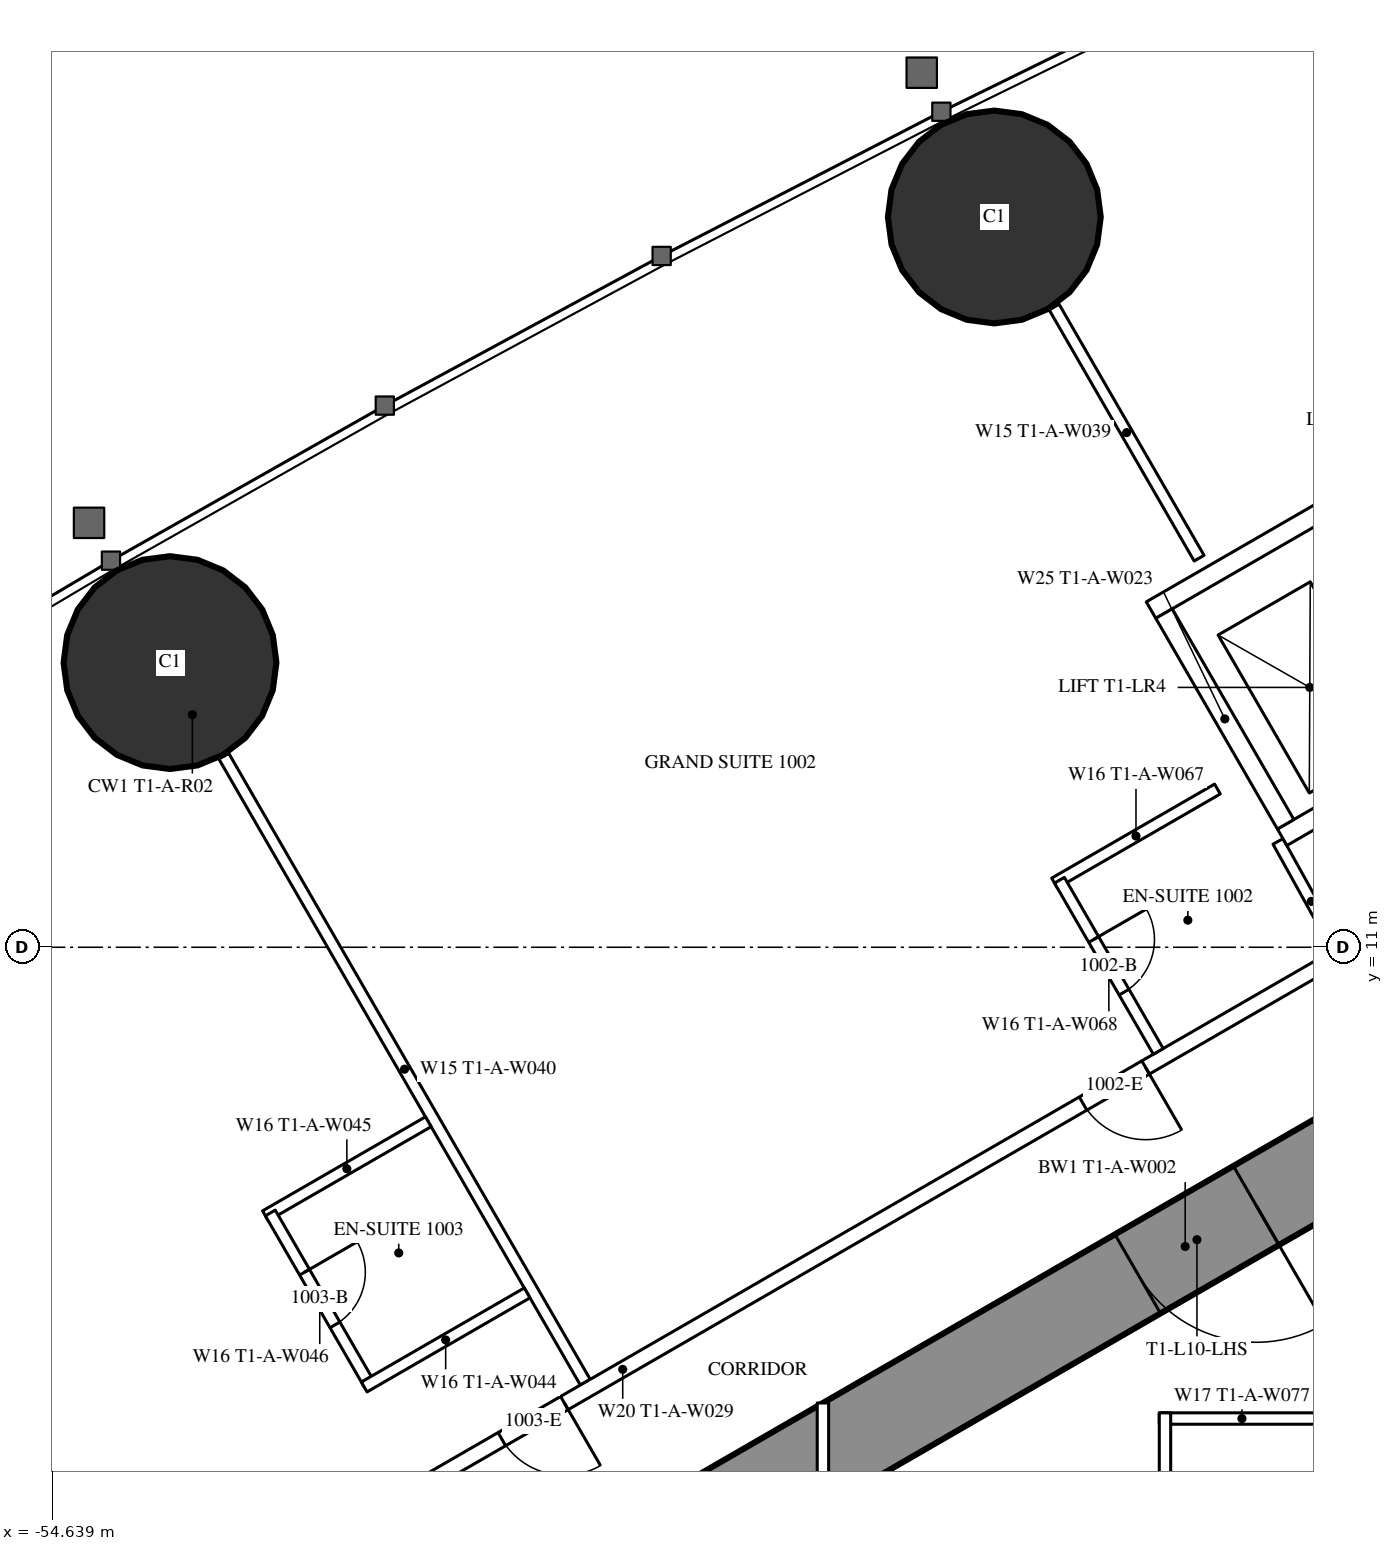
"""IFC4 building model, lengths in metres.
Left out: names, types, materials, properties, quantities, classifications, styles, units other than length and angle.
Written with IfcOpenShell. Run it as: python <this file> out.ifc"""

import sys

from ifc_helpers import new_model, si_unit, direction, frame, frame_2d, origin, origin_2d, place, context, subcontext, project, spatial, rectangle, hollow_circle, extrude, element, fill, save


model = new_model("IFC4")
c1 = context("Model", 3, precision=1e-05, world=origin(), true_north=direction((0.0, 1.0)))
c2 = subcontext(c1, "Body", "Model", "MODEL_VIEW")
j1 = project(units=[si_unit("LENGTHUNIT", "METRE"), si_unit("PLANEANGLEUNIT", "RADIAN")], contexts=[c1])
p1 = place(None, origin())
s1 = spatial("IfcSite", under=j1, at=p1, CompositionType="ELEMENT")
p2 = place(p1, origin())
s2 = spatial("IfcBuilding", under=s1, at=p2, CompositionType="ELEMENT")
p3 = place(p2, frame((0.0, 0.0, 42.5)))
s3 = spatial("IfcBuildingStorey", under=s2, at=p3, CompositionType="ELEMENT", Elevation=42.5)
for number, where, z_axis, x_axis in (
    (1, (-42.245, 20.607, 0.0), (0.0, 0.0, 1.0), (1.0, 0.0, 0.0)),
    (2, (-53.09, 14.745, 0.0), (0.0, 0.0, 1.0), (1.0, 0.0, 0.0)),
):
    element("IfcColumn", number, at=place(p3, frame(where, z_axis=z_axis, x_axis=x_axis)), inside=s3, PredefinedType="COLUMN", context=c2, shape_type="SweptSolid", body=[
        extrude(hollow_circle(Radius=1.4, WallThickness=0.12, at=origin_2d()), origin(), (0.0, 0.0, 1.0), 3.5),
    ])
p4 = place(p3, frame((-27.2, 14.3, 0.0), z_axis=(0.0, 0.0, 1.0), x_axis=(-0.866026593062, -0.499997940104, 0.0)))
e3 = element("IfcWall", 3, at=p4, inside=s3, PredefinedType="SHEAR", context=c2, shape_type="SweptSolid", body=[
    extrude(rectangle(XDim=28.946, YDim=1.2, at=frame_2d((14.473, 0.0))), origin(), (0.0, 0.0, 1.0), 3.5),
])
p5 = place(p4, frame((4.6, 0.0, 0.0)))
e4 = element("IfcOpeningElement", 4, at=p5, cuts=e3, PredefinedType="OPENING", context=c2, shape_type="SweptSolid", body=[
    extrude(rectangle(XDim=1.0, YDim=2.2, at=frame_2d((0.5, 1.1))), frame((0.0, 0.61, 0.0), z_axis=(0.0, -1.0, 0.0), x_axis=(1.0, 0.0, 0.0)), (0.0, 0.0, 1.0), 1.22),
])
p6 = place(p4, frame((13.395, 0.0, 0.0)))
e5 = element("IfcOpeningElement", 5, at=p6, cuts=e3, PredefinedType="OPENING", context=c2, shape_type="SweptSolid", body=[
    extrude(rectangle(XDim=1.8, YDim=2.2, at=frame_2d((0.9, 1.1))), frame((0.0, 0.61, 0.0), z_axis=(0.0, -1.0, 0.0), x_axis=(1.0, 0.0, 0.0)), (0.0, 0.0, 1.0), 1.22),
])
p7 = place(p3, frame((-47.627, 5.278, 0.0), z_axis=(0.0, 0.0, 1.0), x_axis=(-0.500009844318, 0.86601972009, 0.0)))
e6 = element("IfcWall", 6, at=p7, inside=s3, PredefinedType="PARTITIONING", context=c2, shape_type="SweptSolid", body=[
    extrude(rectangle(XDim=9.51, YDim=0.15, at=frame_2d((4.755, 0.0))), origin(), (0.0, 0.0, 1.0), 2.25),
])
p8 = place(p3, frame((-39.551, 16.119, 0.0), z_axis=(0.0, 0.0, 1.0), x_axis=(-0.500014214979, 0.866017196607, 0.0)))
e7 = element("IfcWall", 7, at=p8, inside=s3, PredefinedType="PARTITIONING", context=c2, shape_type="SweptSolid", body=[
    extrude(rectangle(XDim=3.815, YDim=0.15, at=frame_2d((1.907, 0.0))), origin(), (0.0, 0.0, 1.0), 3.25),
])
p9 = place(p3, frame((-37.7, 10.894, 0.0), z_axis=(0.0, 0.0, 1.0), x_axis=(-0.866027905338, -0.499995667157, 0.0)))
e8 = element("IfcWall", 8, at=p9, inside=s3, PredefinedType="PARTITIONING", context=c2, shape_type="SweptSolid", body=[
    extrude(rectangle(XDim=21.787, YDim=0.2, at=frame_2d((10.894, 0.0))), origin(), (0.0, 0.0, 1.0), 3.25),
])
p10 = place(p9, frame((11.78, 0.0, 0.0)))
e9 = element("IfcOpeningElement", 9, at=p10, cuts=e8, PredefinedType="OPENING", context=c2, shape_type="SweptSolid", body=[
    extrude(rectangle(XDim=0.95, YDim=2.2, at=frame_2d((0.475, 1.1))), frame((0.0, 0.11, 0.0), z_axis=(0.0, -1.0, 0.0), x_axis=(1.0, 0.0, 0.0)), (0.0, 0.0, 1.0), 0.22),
])
p11 = place(p9, frame((2.95, 0.0, 0.0)))
e10 = element("IfcOpeningElement", 10, at=p11, cuts=e8, PredefinedType="OPENING", context=c2, shape_type="SweptSolid", body=[
    extrude(rectangle(XDim=0.95, YDim=2.2, at=frame_2d((0.475, 1.1))), frame((0.0, 0.11, 0.0), z_axis=(0.0, -1.0, 0.0), x_axis=(1.0, 0.0, 0.0)), (0.0, 0.0, 1.0), 0.22),
])
p12 = place(p3, frame((-38.513, 12.392, 0.0), z_axis=(0.0, 0.0, 1.0), x_axis=(0.485585508183, -0.874189175317, 0.0)))
e11 = element("IfcWall", 11, at=p12, inside=s3, PredefinedType="PARTITIONING", context=c2, shape_type="SweptSolid", body=[
    extrude(rectangle(XDim=1.805, YDim=0.15, at=frame_2d((0.902, 0.0))), origin(), (0.0, 0.0, 1.0), 3.25),
])
p13 = place(p3, frame((-49.692, 8.704, 0.0), z_axis=(0.0, 0.0, 1.0), x_axis=(-0.866073894602, -0.499916002032, 0.0)))
e12 = element("IfcWall", 12, at=p13, inside=s3, PredefinedType="PARTITIONING", context=c2, shape_type="SweptSolid", body=[
    extrude(rectangle(XDim=2.475, YDim=0.15, at=frame_2d((1.238, 0.0))), origin(), (0.0, 0.0, 1.0), 3.25),
])
p14 = place(p3, frame((-50.47, 5.253, 0.0), z_axis=(0.0, 0.0, 1.0), x_axis=(-0.500006934395, 0.866021400173, 0.0)))
e13 = element("IfcWall", 13, at=p14, inside=s3, PredefinedType="PARTITIONING", context=c2, shape_type="SweptSolid", body=[
    extrude(rectangle(XDim=2.6, YDim=0.15, at=frame_2d((1.3, 0.0))), origin(), (0.0, 0.0, 1.0), 3.25),
])
p15 = place(p14, frame((0.9, 0.0, 0.0)))
e14 = element("IfcOpeningElement", 14, at=p15, cuts=e13, PredefinedType="OPENING", context=c2, shape_type="SweptSolid", body=[
    extrude(rectangle(XDim=0.8, YDim=2.2, at=frame_2d((0.4, 1.1))), frame((0.0, 0.085, 0.0), z_axis=(0.0, -1.0, 0.0), x_axis=(1.0, 0.0, 0.0)), (0.0, 0.0, 1.0), 0.17),
])
p16 = place(p3, frame((-48.392, 6.453, 0.0), z_axis=(0.0, 0.0, 1.0), x_axis=(-0.86604923931, -0.499958713387, 0.0)))
e15 = element("IfcWall", 15, at=p16, inside=s3, PredefinedType="PARTITIONING", context=c2, shape_type="SweptSolid", body=[
    extrude(rectangle(XDim=2.475, YDim=0.15, at=frame_2d((1.237, 0.0))), origin(), (0.0, 0.0, 1.0), 3.25),
])
p17 = place(p3, frame((-39.31, 13.082, 0.0), z_axis=(0.0, 0.0, 1.0), x_axis=(-0.866031185235, -0.4999899861, 0.0)))
e16 = element("IfcWall", 16, at=p17, inside=s3, PredefinedType="PARTITIONING", context=c2, shape_type="SweptSolid", body=[
    extrude(rectangle(XDim=2.475, YDim=0.15, at=frame_2d((1.238, 0.0))), origin(), (0.0, 0.0, 1.0), 3.25),
])
p18 = place(p3, frame((-40.088, 9.63, 0.0), z_axis=(0.0, 0.0, 1.0), x_axis=(-0.500006934395, 0.866021400173, 0.0)))
e17 = element("IfcWall", 17, at=p18, inside=s3, PredefinedType="PARTITIONING", context=c2, shape_type="SweptSolid", body=[
    extrude(rectangle(XDim=2.6, YDim=0.15, at=frame_2d((1.3, 0.0))), origin(), (0.0, 0.0, 1.0), 3.25),
])
p19 = place(p18, frame((0.9, 0.0, 0.0)))
e18 = element("IfcOpeningElement", 18, at=p19, cuts=e17, PredefinedType="OPENING", context=c2, shape_type="SweptSolid", body=[
    extrude(rectangle(XDim=0.8, YDim=2.2, at=frame_2d((0.4, 1.1))), frame((0.0, 0.085, 0.0), z_axis=(0.0, -1.0, 0.0), x_axis=(1.0, 0.0, 0.0)), (0.0, 0.0, 1.0), 0.17),
])
p20 = place(p3, frame((-37.9, 4.8, 0.0), z_axis=(0.0, 0.0, 1.0), x_axis=(-1.0, 0.0, 0.0)))
e19 = element("IfcWall", 19, at=p20, inside=s3, PredefinedType="PARTITIONING", context=c2, shape_type="SweptSolid", body=[
    extrude(rectangle(XDim=2.175, YDim=0.15, at=frame_2d((1.087, 0.0))), origin(), (0.0, 0.0, 1.0), 3.25),
])
p21 = place(p3, frame((-40.0, 4.875, 0.0), z_axis=(0.0, 0.0, 1.0), x_axis=(0.0, -1.0, 0.0)))
e20 = element("IfcWall", 20, at=p21, inside=s3, PredefinedType="PARTITIONING", context=c2, shape_type="SweptSolid", body=[
    extrude(rectangle(XDim=3.75, YDim=0.15, at=frame_2d((1.875, 0.0))), origin(), (0.0, 0.0, 1.0), 3.25),
])
p22 = place(p21, frame((1.375, 0.0, 0.0)))
e21 = element("IfcOpeningElement", 21, at=p22, cuts=e20, PredefinedType="OPENING", context=c2, shape_type="SweptSolid", body=[
    extrude(rectangle(XDim=1.0, YDim=2.2, at=frame_2d((0.5, 1.1))), frame((0.0, 0.085, 0.0), z_axis=(0.0, -1.0, 0.0), x_axis=(1.0, 0.0, 0.0)), (0.0, 0.0, 1.0), 0.17),
])
p23 = place(p3, frame((-44.5, 5.005, 0.0), z_axis=(0.0, 0.0, 1.0), x_axis=(0.0, -1.0, 0.0)))
e22 = element("IfcWall", 22, at=p23, inside=s3, PredefinedType="PARTITIONING", context=c2, shape_type="SweptSolid", body=[
    extrude(rectangle(XDim=10.009, YDim=0.15, at=frame_2d((5.005, 0.0))), origin(), (0.0, 0.0, 1.0), 2.45),
])
p24 = place(p23, frame((4.505, 0.0, 0.0)))
e23 = element("IfcOpeningElement", 23, at=p24, cuts=e22, PredefinedType="OPENING", context=c2, shape_type="SweptSolid", body=[
    extrude(rectangle(XDim=1.0, YDim=2.2, at=frame_2d((0.5, 1.1))), frame((0.0, 0.085, 0.0), z_axis=(0.0, -1.0, 0.0), x_axis=(1.0, 0.0, 0.0)), (0.0, 0.0, 1.0), 0.17),
])
p25 = place(p3, frame((-31.01, 16.747, 0.0), z_axis=(0.0, 0.0, 1.0), x_axis=(-0.866028165386, -0.499995216735, 0.0)))
e24 = element("IfcWall", 24, at=p25, inside=s3, PredefinedType="PARTITIONING", context=c2, shape_type="SweptSolid", body=[
    extrude(rectangle(XDim=8.6, YDim=0.25, at=frame_2d((4.3, 0.0))), origin(), (0.0, 0.0, 1.0), 3.25),
])
p26 = place(p25, frame((0.75, 0.0, 0.0)))
e25 = element("IfcOpeningElement", 25, at=p26, cuts=e24, PredefinedType="OPENING", context=c2, shape_type="SweptSolid", body=[
    extrude(rectangle(XDim=1.1, YDim=2.2, at=frame_2d((0.55, 1.1))), frame((0.0, 0.135, 0.0), z_axis=(0.0, -1.0, 0.0), x_axis=(1.0, 0.0, 0.0)), (0.0, 0.0, 1.0), 0.27),
])
p27 = place(p25, frame((2.75, 0.0, 0.0)))
e26 = element("IfcOpeningElement", 26, at=p27, cuts=e24, PredefinedType="OPENING", context=c2, shape_type="SweptSolid", body=[
    extrude(rectangle(XDim=1.1, YDim=2.2, at=frame_2d((0.55, 1.1))), frame((0.0, 0.135, 0.0), z_axis=(0.0, -1.0, 0.0), x_axis=(1.0, 0.0, 0.0)), (0.0, 0.0, 1.0), 0.27),
])
p28 = place(p25, frame((4.75, 0.0, 0.0)))
e27 = element("IfcOpeningElement", 27, at=p28, cuts=e24, PredefinedType="OPENING", context=c2, shape_type="SweptSolid", body=[
    extrude(rectangle(XDim=1.1, YDim=2.2, at=frame_2d((0.55, 1.1))), frame((0.0, 0.135, 0.0), z_axis=(0.0, -1.0, 0.0), x_axis=(1.0, 0.0, 0.0)), (0.0, 0.0, 1.0), 0.27),
])
p29 = place(p25, frame((6.75, 0.0, 0.0)))
e28 = element("IfcOpeningElement", 28, at=p29, cuts=e24, PredefinedType="OPENING", context=c2, shape_type="SweptSolid", body=[
    extrude(rectangle(XDim=1.1, YDim=2.2, at=frame_2d((0.55, 1.1))), frame((0.0, 0.135, 0.0), z_axis=(0.0, -1.0, 0.0), x_axis=(1.0, 0.0, 0.0)), (0.0, 0.0, 1.0), 0.27),
])
p30 = place(p3, frame((-32.736, 19.736, 0.0), z_axis=(0.0, 0.0, 1.0), x_axis=(-0.866028165386, -0.499995216735, 0.0)))
e29 = element("IfcWall", 29, at=p30, inside=s3, PredefinedType="PARTITIONING", context=c2, shape_type="SweptSolid", body=[
    extrude(rectangle(XDim=8.6, YDim=0.25, at=frame_2d((4.3, 0.0))), origin(), (0.0, 0.0, 1.0), 3.25),
])
p31 = place(p3, frame((-38.413, 12.618, 0.0), z_axis=(0.0, 0.0, 1.0), x_axis=(-0.499872130319, 0.866099216793, 0.0)))
e30 = element("IfcWall", 30, at=p31, inside=s3, PredefinedType="PARTITIONING", context=c2, shape_type="SweptSolid", body=[
    extrude(rectangle(XDim=3.2, YDim=0.25, at=frame_2d((1.6, 0.0))), origin(), (0.0, 0.0, 1.0), 3.25),
])
p32 = place(p15, origin())
e31 = element("IfcDoor", 31, at=p32, inside=s3, OperationType="SINGLE_SWING_RIGHT", PredefinedType="DOOR", context=c2, shape_type="SweptSolid", body=[
    extrude(rectangle(XDim=0.8, YDim=2.2, at=frame_2d((0.4, 1.1))), frame((0.0, 0.025, 0.0), z_axis=(0.0, -1.0, 0.0), x_axis=(1.0, 0.0, 0.0)), (0.0, 0.0, 1.0), 0.05),
])
fill(e14, e31)
p33 = place(p10, origin())
e32 = element("IfcDoor", 32, at=p33, inside=s3, OperationType="SINGLE_SWING_LEFT", PredefinedType="DOOR", context=c2, shape_type="SweptSolid", body=[
    extrude(rectangle(XDim=0.95, YDim=2.2, at=frame_2d((0.475, 1.1))), frame((0.0, 0.025, 0.0), z_axis=(0.0, -1.0, 0.0), x_axis=(1.0, 0.0, 0.0)), (0.0, 0.0, 1.0), 0.05),
])
fill(e9, e32)
p34 = place(p19, origin())
e33 = element("IfcDoor", 33, at=p34, inside=s3, OperationType="SINGLE_SWING_RIGHT", PredefinedType="DOOR", context=c2, shape_type="SweptSolid", body=[
    extrude(rectangle(XDim=0.8, YDim=2.2, at=frame_2d((0.4, 1.1))), frame((0.0, 0.025, 0.0), z_axis=(0.0, -1.0, 0.0), x_axis=(1.0, 0.0, 0.0)), (0.0, 0.0, 1.0), 0.05),
])
fill(e18, e33)
p35 = place(p11, origin())
e34 = element("IfcDoor", 34, at=p35, inside=s3, OperationType="SINGLE_SWING_LEFT", PredefinedType="DOOR", context=c2, shape_type="SweptSolid", body=[
    extrude(rectangle(XDim=0.95, YDim=2.2, at=frame_2d((0.475, 1.1))), frame((0.0, 0.025, 0.0), z_axis=(0.0, -1.0, 0.0), x_axis=(1.0, 0.0, 0.0)), (0.0, 0.0, 1.0), 0.05),
])
fill(e10, e34)
p36 = place(p6, origin())
e35 = element("IfcDoor", 35, at=p36, inside=s3, OperationType="DOUBLE_DOOR_SINGLE_SWING", PredefinedType="DOOR", context=c2, shape_type="SweptSolid", body=[
    extrude(rectangle(XDim=1.8, YDim=2.2, at=frame_2d((0.9, 1.1))), frame((0.0, 0.025, 0.0), z_axis=(0.0, -1.0, 0.0), x_axis=(1.0, 0.0, 0.0)), (0.0, 0.0, 1.0), 0.05),
])
fill(e5, e35)
save(model, sys.argv[1])
